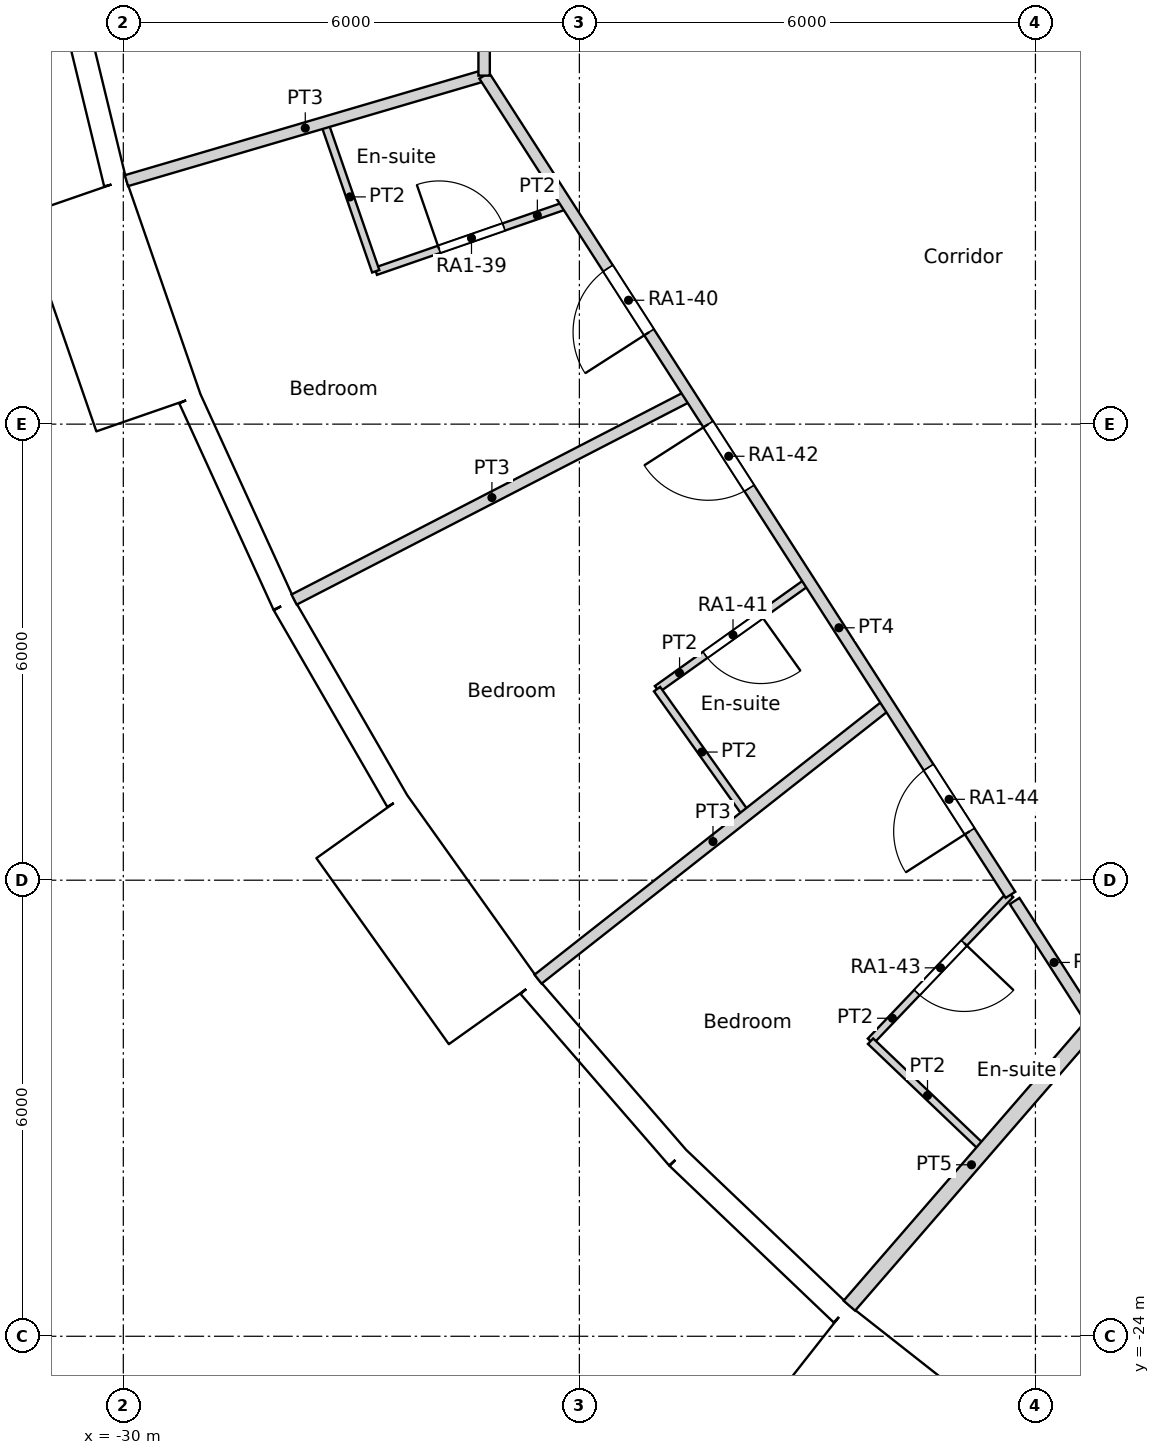
"""IFC4 building model, lengths in metres.
Left out: names, types, materials, properties, quantities, classifications, styles, units other than length and angle.
Written with IfcOpenShell. Run it as: python <this file> out.ifc"""

import sys

from ifc_helpers import new_model, si_unit, direction, frame, frame_2d, origin, origin_2d, place, context, subcontext, project, spatial, rectangle, circle, extrude, element, fill, save


model = new_model("IFC4")
c1 = context("Model", 3, precision=1e-05, world=origin(), true_north=direction((0.0, 1.0)))
c2 = subcontext(c1, "Body", "Model", "MODEL_VIEW")
j1 = project(units=[si_unit("LENGTHUNIT", "METRE"), si_unit("PLANEANGLEUNIT", "RADIAN")], contexts=[c1])
p1 = place(None, origin())
s1 = spatial("IfcSite", under=j1, at=p1, CompositionType="ELEMENT")
p2 = place(p1, origin())
s2 = spatial("IfcBuilding", under=s1, at=p2, CompositionType="ELEMENT")
p3 = place(p2, frame((0.0, 0.0, 28.2)))
s3 = spatial("IfcBuildingStorey", under=s2, at=p3, CompositionType="ELEMENT", Elevation=28.2)
for number, where, z_axis, x_axis in (
    (1, (-29.048, -8.529, 0.0), (0.0, 0.0, 1.0), (1.0, 0.0, 0.0)),
    (2, (-26.909, -13.873, 0.0), (0.0, 0.0, 1.0), (1.0, 0.0, 0.0)),
    (3, (-23.797, -18.715, 0.0), (0.0, 0.0, 1.0), (1.0, 0.0, 0.0)),
    (4, (-19.826, -22.88, 0.0), (0.0, 0.0, 1.0), (1.0, 0.0, 0.0)),
):
    element("IfcColumn", number, at=place(p3, frame(where, z_axis=z_axis, x_axis=x_axis)), inside=s3, PredefinedType="COLUMN", context=c2, shape_type="SweptSolid", body=[
        extrude(circle(Radius=0.7, at=origin_2d()), origin(), (0.0, 0.0, 1.0), 3.6),
    ])
for number, where, z_axis, x_axis in (
    (5, (-23.067, -8.396, 0.0), (0.0, 0.0, 1.0), (1.0, 0.0, 0.0)),
    (6, (-20.509, -13.489, 0.0), (0.0, 0.0, 1.0), (1.0, 0.0, 0.0)),
    (7, (-16.846, -17.855, 0.0), (0.0, 0.0, 1.0), (1.0, 0.0, 0.0)),
):
    element("IfcColumn", number, at=place(p3, frame(where, z_axis=z_axis, x_axis=x_axis)), inside=s3, PredefinedType="COLUMN", context=c2, shape_type="SweptSolid", body=[
        extrude(circle(Radius=0.75, at=origin_2d()), origin(), (0.0, 0.0, 1.0), 3.6),
    ])
p4 = place(p3, frame((-16.958, -8.167, 0.0), z_axis=(0.0, 0.0, 1.0), x_axis=(1.0, 0.0, 0.0)))
e8 = element("IfcColumn", 8, at=p4, inside=s3, PredefinedType="COLUMN", context=c2, shape_type="SweptSolid", body=[
    extrude(circle(Radius=0.8, at=origin_2d()), origin(), (0.0, 0.0, 1.0), 3.6),
])
p5 = place(p3, frame((-30.807, -5.938, 0.0), z_axis=(0.0, 0.0, 1.0), x_axis=(0.235743081534, -0.971815414319, 0.0)))
e9 = element("IfcWall", 9, at=p5, inside=s3, PredefinedType="SOLIDWALL", context=c2, shape_type="SweptSolid", body=[
    extrude(rectangle(XDim=2.979, YDim=0.3, at=frame_2d((1.49, 0.0))), origin(), (0.0, 0.0, 1.0), 3.15),
])
p6 = place(p5, frame((1.49, 0.0, 1.55)))
e10 = element("IfcOpeningElement", 10, at=p6, cuts=e9, PredefinedType="OPENING", context=c2, shape_type="SweptSolid", body=[
    extrude(circle(Radius=0.9, at=origin_2d()), frame((0.0, 0.16, 0.0), z_axis=(0.0, -1.0, 0.0), x_axis=(1.0, 0.0, 0.0)), (0.0, 0.0, 1.0), 0.32),
])
p7 = place(p3, frame((-30.649, -9.021, -0.45), z_axis=(0.0, 0.0, 1.0), x_axis=(0.327071431777, -0.944999618262, 0.0)))
e11 = element("IfcWall", 11, at=p7, inside=s3, PredefinedType="ELEMENTEDWALL", context=c2, shape_type="SweptSolid", body=[
    extrude(rectangle(XDim=3.0, YDim=1.45, at=frame_2d((1.5, 0.0))), origin(), (0.0, 0.0, 1.0), 3.6),
])
p8 = place(p7, frame((1.5, 0.0, 2.0)))
e12 = element("IfcOpeningElement", 12, at=p8, cuts=e11, PredefinedType="OPENING", context=c2, shape_type="SweptSolid", body=[
    extrude(circle(Radius=0.9, at=origin_2d()), frame((0.0, 0.735, 0.0), z_axis=(0.0, -1.0, 0.0), x_axis=(1.0, 0.0, 0.0)), (0.0, 0.0, 1.0), 1.47),
])
p9 = place(p3, frame((-29.125, -11.666, 0.0), z_axis=(0.0, 0.0, 1.0), x_axis=(0.415407317162, -0.909635509888, 0.0)))
e13 = element("IfcWall", 13, at=p9, inside=s3, PredefinedType="SOLIDWALL", context=c2, shape_type="SweptSolid", body=[
    extrude(rectangle(XDim=2.98, YDim=0.3, at=frame_2d((1.49, 0.0))), origin(), (0.0, 0.0, 1.0), 3.15),
])
p10 = place(p9, frame((1.49, 0.0, 1.55)))
e14 = element("IfcOpeningElement", 14, at=p10, cuts=e13, PredefinedType="OPENING", context=c2, shape_type="SweptSolid", body=[
    extrude(circle(Radius=0.9, at=origin_2d()), frame((0.0, 0.16, 0.0), z_axis=(0.0, -1.0, 0.0), x_axis=(1.0, 0.0, 0.0)), (0.0, 0.0, 1.0), 0.32),
])
p11 = place(p3, frame((-27.887, -14.377, 0.0), z_axis=(0.0, 0.0, 1.0), x_axis=(0.499999078476, -0.866025935826, 0.0)))
e15 = element("IfcWall", 15, at=p11, inside=s3, PredefinedType="SOLIDWALL", context=c2, shape_type="SweptSolid", body=[
    extrude(rectangle(XDim=2.979, YDim=0.3, at=frame_2d((1.49, 0.0))), origin(), (0.0, 0.0, 1.0), 3.15),
])
p12 = place(p11, frame((1.49, 0.0, 1.55)))
e16 = element("IfcOpeningElement", 16, at=p12, cuts=e15, PredefinedType="OPENING", context=c2, shape_type="SweptSolid", body=[
    extrude(circle(Radius=0.9, at=origin_2d()), frame((0.0, 0.16, 0.0), z_axis=(0.0, -1.0, 0.0), x_axis=(1.0, 0.0, 0.0)), (0.0, 0.0, 1.0), 0.32),
])
p13 = place(p3, frame((-26.866, -17.29, -0.45), z_axis=(0.0, 0.0, 1.0), x_axis=(0.580090570606, -0.814551981088, 0.0)))
e17 = element("IfcWall", 17, at=p13, inside=s3, PredefinedType="ELEMENTEDWALL", context=c2, shape_type="SweptSolid", body=[
    extrude(rectangle(XDim=3.0, YDim=1.45, at=frame_2d((1.5, 0.0))), origin(), (0.0, 0.0, 1.0), 3.6),
])
p14 = place(p13, frame((1.5, 0.0, 2.0)))
e18 = element("IfcOpeningElement", 18, at=p14, cuts=e17, PredefinedType="OPENING", context=c2, shape_type="SweptSolid", body=[
    extrude(circle(Radius=0.9, at=origin_2d()), frame((0.0, 0.735, 0.0), z_axis=(0.0, -1.0, 0.0), x_axis=(1.0, 0.0, 0.0)), (0.0, 0.0, 1.0), 1.47),
])
p15 = place(p3, frame((-24.658, -19.399, 0.0), z_axis=(0.0, 0.0, 1.0), x_axis=(0.654830712471, -0.755775587066, 0.0)))
e19 = element("IfcWall", 19, at=p15, inside=s3, PredefinedType="SOLIDWALL", context=c2, shape_type="SweptSolid", body=[
    extrude(rectangle(XDim=2.98, YDim=0.3, at=frame_2d((1.49, 0.0))), origin(), (0.0, 0.0, 1.0), 3.15),
])
p16 = place(p15, frame((1.49, 0.0, 1.55)))
e20 = element("IfcOpeningElement", 20, at=p16, cuts=e19, PredefinedType="OPENING", context=c2, shape_type="SweptSolid", body=[
    extrude(circle(Radius=0.9, at=origin_2d()), frame((0.0, 0.16, 0.0), z_axis=(0.0, -1.0, 0.0), x_axis=(1.0, 0.0, 0.0)), (0.0, 0.0, 1.0), 0.32),
])
p17 = place(p3, frame((-22.707, -21.651, 0.0), z_axis=(0.0, 0.0, 1.0), x_axis=(0.723744206617, -0.690068346896, 0.0)))
e21 = element("IfcWall", 21, at=p17, inside=s3, PredefinedType="SOLIDWALL", context=c2, shape_type="SweptSolid", body=[
    extrude(rectangle(XDim=2.98, YDim=0.3, at=frame_2d((1.49, 0.0))), origin(), (0.0, 0.0, 1.0), 3.15),
])
p18 = place(p17, frame((1.49, 0.0, 1.55)))
e22 = element("IfcOpeningElement", 22, at=p18, cuts=e21, PredefinedType="OPENING", context=c2, shape_type="SweptSolid", body=[
    extrude(circle(Radius=0.9, at=origin_2d()), frame((0.0, 0.16, 0.0), z_axis=(0.0, -1.0, 0.0), x_axis=(1.0, 0.0, 0.0)), (0.0, 0.0, 1.0), 0.32),
])
p19 = place(p3, frame((-20.907, -24.159, -0.45), z_axis=(0.0, 0.0, 1.0), x_axis=(0.786049992888, -0.618162930529, 0.0)))
e23 = element("IfcWall", 23, at=p19, inside=s3, PredefinedType="ELEMENTEDWALL", context=c2, shape_type="SweptSolid", body=[
    extrude(rectangle(XDim=3.0, YDim=1.45, at=frame_2d((1.5, 0.0))), origin(), (0.0, 0.0, 1.0), 3.6),
])
p20 = place(p19, frame((1.5, 0.0, 2.0)))
e24 = element("IfcOpeningElement", 24, at=p20, cuts=e23, PredefinedType="OPENING", context=c2, shape_type="SweptSolid", body=[
    extrude(circle(Radius=0.9, at=origin_2d()), frame((0.0, 0.735, 0.0), z_axis=(0.0, -1.0, 0.0), x_axis=(1.0, 0.0, 0.0)), (0.0, 0.0, 1.0), 1.47),
])
p21 = place(p3, frame((-25.253, -7.415, 0.0), z_axis=(0.0, 0.0, 1.0), x_axis=(0.0, 1.0, 0.0)))
e25 = element("IfcWall", 25, at=p21, inside=s3, PredefinedType="PARTITIONING", context=c2, shape_type="SweptSolid", body=[
    extrude(rectangle(XDim=14.83, YDim=0.15, at=frame_2d((7.415, 0.0))), origin(), (0.0, 0.0, 1.0), 3.15),
])
p22 = place(p21, frame((12.797, 0.0, 0.0)))
e26 = element("IfcOpeningElement", 26, at=p22, cuts=e25, PredefinedType="OPENING", context=c2, shape_type="SweptSolid", body=[
    extrude(rectangle(XDim=1.0, YDim=2.1, at=frame_2d((0.5, 1.05))), frame((0.0, 0.075, 0.0), z_axis=(0.0, -1.0, 0.0), x_axis=(1.0, 0.0, 0.0)), (0.0, 0.0, 1.0), 0.15),
])
p23 = place(p21, frame((5.954, 0.0, 0.0)))
e27 = element("IfcOpeningElement", 27, at=p23, cuts=e25, PredefinedType="OPENING", context=c2, shape_type="SweptSolid", body=[
    extrude(rectangle(XDim=1.0, YDim=2.1, at=frame_2d((0.5, 1.05))), frame((0.0, 0.075, 0.0), z_axis=(0.0, -1.0, 0.0), x_axis=(1.0, 0.0, 0.0)), (0.0, 0.0, 1.0), 0.15),
])
p24 = place(p21, frame((1.034, 0.0, 0.0)))
e28 = element("IfcOpeningElement", 28, at=p24, cuts=e25, PredefinedType="OPENING", context=c2, shape_type="SweptSolid", body=[
    extrude(rectangle(XDim=1.0, YDim=2.1, at=frame_2d((0.5, 1.05))), frame((0.0, 0.075, 0.0), z_axis=(0.0, -1.0, 0.0), x_axis=(1.0, 0.0, 0.0)), (0.0, 0.0, 1.0), 0.15),
])
p25 = place(p3, frame((-25.252, -7.415, 0.0), z_axis=(0.0, 0.0, 1.0), x_axis=(0.540498462047, -0.84134500208, 0.0)))
e29 = element("IfcWall", 29, at=p25, inside=s3, PredefinedType="PARTITIONING", context=c2, shape_type="SweptSolid", body=[
    extrude(rectangle(XDim=12.811, YDim=0.15, at=frame_2d((6.405, 0.0))), origin(), (0.0, 0.0, 1.0), 3.15),
])
p26 = place(p25, frame((3.013, 0.0, 0.0)))
e30 = element("IfcOpeningElement", 30, at=p26, cuts=e29, PredefinedType="OPENING", context=c2, shape_type="SweptSolid", body=[
    extrude(rectangle(XDim=1.0, YDim=2.1, at=frame_2d((0.5, 1.05))), frame((0.0, 0.075, 0.0), z_axis=(0.0, -1.0, 0.0), x_axis=(1.0, 0.0, 0.0)), (0.0, 0.0, 1.0), 0.15),
])
p27 = place(p25, frame((5.452, 0.0, 0.0)))
e31 = element("IfcOpeningElement", 31, at=p27, cuts=e29, PredefinedType="OPENING", context=c2, shape_type="SweptSolid", body=[
    extrude(rectangle(XDim=1.0, YDim=2.1, at=frame_2d((0.5, 1.05))), frame((0.0, 0.075, 0.0), z_axis=(0.0, -1.0, 0.0), x_axis=(1.0, 0.0, 0.0)), (0.0, 0.0, 1.0), 0.15),
])
p28 = place(p25, frame((10.817, 0.0, 0.0)))
e32 = element("IfcOpeningElement", 32, at=p28, cuts=e29, PredefinedType="OPENING", context=c2, shape_type="SweptSolid", body=[
    extrude(rectangle(XDim=1.0, YDim=2.1, at=frame_2d((0.5, 1.05))), frame((0.0, 0.075, 0.0), z_axis=(0.0, -1.0, 0.0), x_axis=(1.0, 0.0, 0.0)), (0.0, 0.0, 1.0), 0.15),
])
p29 = place(p3, frame((-18.274, -18.274, 0.0), z_axis=(0.0, 0.0, 1.0), x_axis=(0.540751168176, -0.841182604502, 0.0)))
e33 = element("IfcWall", 33, at=p29, inside=s3, PredefinedType="PARTITIONING", context=c2, shape_type="SweptSolid", body=[
    extrude(rectangle(XDim=1.921, YDim=0.15, at=frame_2d((0.96, 0.0))), origin(), (0.0, 0.0, 1.0), 3.15),
])
p30 = place(p3, frame((-29.959, -8.797, 0.0), z_axis=(0.0, 0.0, 1.0), x_axis=(0.959434430266, 0.281931860598, 0.0)))
e34 = element("IfcWall", 34, at=p30, inside=s3, PredefinedType="PARTITIONING", context=c2, shape_type="SweptSolid", body=[
    extrude(rectangle(XDim=4.905, YDim=0.15, at=frame_2d((2.452, 0.0))), origin(), (0.0, 0.0, 1.0), 3.15),
])
p31 = place(p3, frame((-27.356, -8.032, 0.0), z_axis=(0.0, 0.0, 1.0), x_axis=(0.326924291943, -0.945050531632, 0.0)))
e35 = element("IfcWall", 35, at=p31, inside=s3, PredefinedType="PARTITIONING", context=c2, shape_type="SweptSolid", body=[
    extrude(rectangle(XDim=2.071, YDim=0.1, at=frame_2d((1.035, 0.0))), origin(), (0.0, 0.0, 1.0), 3.15),
])
p32 = place(p3, frame((-26.679, -9.989, 0.0), z_axis=(0.0, 0.0, 1.0), x_axis=(0.945014370431, 0.327028805578, 0.0)))
e36 = element("IfcWall", 36, at=p32, inside=s3, PredefinedType="PARTITIONING", context=c2, shape_type="SweptSolid", body=[
    extrude(rectangle(XDim=2.667, YDim=0.1, at=frame_2d((1.333, 0.0))), origin(), (0.0, 0.0, 1.0), 3.15),
])
p33 = place(p32, frame((0.883, 0.0, 0.0)))
e37 = element("IfcOpeningElement", 37, at=p33, cuts=e36, PredefinedType="OPENING", context=c2, shape_type="SweptSolid", body=[
    extrude(rectangle(XDim=0.9, YDim=2.04, at=frame_2d((0.45, 1.02))), frame((0.0, 0.05, 0.0), z_axis=(0.0, -1.0, 0.0), x_axis=(1.0, 0.0, 0.0)), (0.0, 0.0, 1.0), 0.1),
])
p34 = place(p3, frame((-27.753, -14.308, 0.0), z_axis=(0.0, 0.0, 1.0), x_axis=(0.88877955153, 0.45833493079, 0.0)))
e38 = element("IfcWall", 38, at=p34, inside=s3, PredefinedType="PARTITIONING", context=c2, shape_type="SweptSolid", body=[
    extrude(rectangle(XDim=5.856, YDim=0.15, at=frame_2d((2.928, 0.0))), origin(), (0.0, 0.0, 1.0), 3.15),
])
p35 = place(p3, frame((-22.978, -15.486, 0.0), z_axis=(0.0, 0.0, 1.0), x_axis=(0.814519517834, 0.580136152181, 0.0)))
e39 = element("IfcWall", 39, at=p35, inside=s3, PredefinedType="PARTITIONING", context=c2, shape_type="SweptSolid", body=[
    extrude(rectangle(XDim=2.453, YDim=0.1, at=frame_2d((1.227, 0.0))), origin(), (0.0, 0.0, 1.0), 3.15),
])
p36 = place(p35, frame((0.777, 0.0, 0.0)))
e40 = element("IfcOpeningElement", 40, at=p36, cuts=e39, PredefinedType="OPENING", context=c2, shape_type="SweptSolid", body=[
    extrude(rectangle(XDim=0.9, YDim=2.04, at=frame_2d((0.45, 1.02))), frame((0.0, 0.05, 0.0), z_axis=(0.0, -1.0, 0.0), x_axis=(1.0, 0.0, 0.0)), (0.0, 0.0, 1.0), 0.1),
])
p37 = place(p3, frame((-22.978, -15.486, 0.0), z_axis=(0.0, 0.0, 1.0), x_axis=(0.580283748447, -0.814414373208, 0.0)))
e41 = element("IfcWall", 41, at=p37, inside=s3, PredefinedType="PARTITIONING", context=c2, shape_type="SweptSolid", body=[
    extrude(rectangle(XDim=2.033, YDim=0.1, at=frame_2d((1.017, 0.0))), origin(), (0.0, 0.0, 1.0), 3.15),
])
p38 = place(p3, frame((-24.544, -19.302, 0.0), z_axis=(0.0, 0.0, 1.0), x_axis=(0.78597832915, 0.618254046576, 0.0)))
e42 = element("IfcWall", 42, at=p38, inside=s3, PredefinedType="PARTITIONING", context=c2, shape_type="SweptSolid", body=[
    extrude(rectangle(XDim=5.857, YDim=0.15, at=frame_2d((2.929, 0.0))), origin(), (0.0, 0.0, 1.0), 3.15),
])
p39 = place(p3, frame((-20.169, -20.118, 0.0), z_axis=(0.0, 0.0, 1.0), x_axis=(0.690011756227, 0.723798159896, 0.0)))
e43 = element("IfcWall", 43, at=p39, inside=s3, PredefinedType="PARTITIONING", context=c2, shape_type="SweptSolid", body=[
    extrude(rectangle(XDim=2.667, YDim=0.1, at=frame_2d((1.333, 0.0))), origin(), (0.0, 0.0, 1.0), 3.15),
])
p40 = place(p39, frame((0.884, 0.0, 0.0)))
e44 = element("IfcOpeningElement", 44, at=p40, cuts=e43, PredefinedType="OPENING", context=c2, shape_type="SweptSolid", body=[
    extrude(rectangle(XDim=0.9, YDim=2.04, at=frame_2d((0.45, 1.02))), frame((0.0, 0.05, 0.0), z_axis=(0.0, -1.0, 0.0), x_axis=(1.0, 0.0, 0.0)), (0.0, 0.0, 1.0), 0.1),
])
p41 = place(p3, frame((-20.169, -20.118, 0.0), z_axis=(0.0, 0.0, 1.0), x_axis=(0.723537557066, -0.690285016145, 0.0)))
e45 = element("IfcWall", 45, at=p41, inside=s3, PredefinedType="PARTITIONING", context=c2, shape_type="SweptSolid", body=[
    extrude(rectangle(XDim=2.071, YDim=0.1, at=frame_2d((1.035, 0.0))), origin(), (0.0, 0.0, 1.0), 3.15),
])
p42 = place(p3, frame((-20.448, -23.598, 0.0), z_axis=(0.0, 0.0, 1.0), x_axis=(0.654847179409, 0.755761319214, 0.0)))
e46 = element("IfcWall", 46, at=p42, inside=s3, PredefinedType="PARTITIONING", context=c2, shape_type="SweptSolid", body=[
    extrude(rectangle(XDim=4.906, YDim=0.2, at=frame_2d((2.453, 0.0))), origin(), (0.0, 0.0, 1.0), 3.15),
])
p43 = place(p6, origin())
e47 = element("IfcWindow", 47, at=p43, inside=s3, PartitioningType="SINGLE_PANEL", PredefinedType="WINDOW", context=c2, shape_type="SweptSolid", body=[
    extrude(circle(Radius=0.9, at=origin_2d()), frame((0.0, 0.12, 0.0), z_axis=(0.0, -1.0, 0.0), x_axis=(1.0, 0.0, 0.0)), (0.0, 0.0, 1.0), 0.1),
])
fill(e10, e47)
p44 = place(p8, origin())
e48 = element("IfcWindow", 48, at=p44, inside=s3, PartitioningType="SINGLE_PANEL", PredefinedType="WINDOW", context=c2, shape_type="SweptSolid", body=[
    extrude(circle(Radius=0.9, at=origin_2d()), frame((0.0, 0.695, 0.0), z_axis=(0.0, -1.0, 0.0), x_axis=(1.0, 0.0, 0.0)), (0.0, 0.0, 1.0), 0.1),
])
fill(e12, e48)
p45 = place(p10, origin())
e49 = element("IfcWindow", 49, at=p45, inside=s3, PartitioningType="SINGLE_PANEL", PredefinedType="WINDOW", context=c2, shape_type="SweptSolid", body=[
    extrude(circle(Radius=0.9, at=origin_2d()), frame((0.0, 0.12, 0.0), z_axis=(0.0, -1.0, 0.0), x_axis=(1.0, 0.0, 0.0)), (0.0, 0.0, 1.0), 0.1),
])
fill(e14, e49)
p46 = place(p12, origin())
e50 = element("IfcWindow", 50, at=p46, inside=s3, PartitioningType="SINGLE_PANEL", PredefinedType="WINDOW", context=c2, shape_type="SweptSolid", body=[
    extrude(circle(Radius=0.9, at=origin_2d()), frame((0.0, 0.12, 0.0), z_axis=(0.0, -1.0, 0.0), x_axis=(1.0, 0.0, 0.0)), (0.0, 0.0, 1.0), 0.1),
])
fill(e16, e50)
p47 = place(p14, origin())
e51 = element("IfcWindow", 51, at=p47, inside=s3, PartitioningType="SINGLE_PANEL", PredefinedType="WINDOW", context=c2, shape_type="SweptSolid", body=[
    extrude(circle(Radius=0.9, at=origin_2d()), frame((0.0, 0.695, 0.0), z_axis=(0.0, -1.0, 0.0), x_axis=(1.0, 0.0, 0.0)), (0.0, 0.0, 1.0), 0.1),
])
fill(e18, e51)
p48 = place(p16, origin())
e52 = element("IfcWindow", 52, at=p48, inside=s3, PartitioningType="SINGLE_PANEL", PredefinedType="WINDOW", context=c2, shape_type="SweptSolid", body=[
    extrude(circle(Radius=0.9, at=origin_2d()), frame((0.0, 0.12, 0.0), z_axis=(0.0, -1.0, 0.0), x_axis=(1.0, 0.0, 0.0)), (0.0, 0.0, 1.0), 0.1),
])
fill(e20, e52)
p49 = place(p18, origin())
e53 = element("IfcWindow", 53, at=p49, inside=s3, PartitioningType="SINGLE_PANEL", PredefinedType="WINDOW", context=c2, shape_type="SweptSolid", body=[
    extrude(circle(Radius=0.9, at=origin_2d()), frame((0.0, 0.12, 0.0), z_axis=(0.0, -1.0, 0.0), x_axis=(1.0, 0.0, 0.0)), (0.0, 0.0, 1.0), 0.1),
])
fill(e22, e53)
p50 = place(p20, origin())
e54 = element("IfcWindow", 54, at=p50, inside=s3, PartitioningType="SINGLE_PANEL", PredefinedType="WINDOW", context=c2, shape_type="SweptSolid", body=[
    extrude(circle(Radius=0.9, at=origin_2d()), frame((0.0, 0.695, 0.0), z_axis=(0.0, -1.0, 0.0), x_axis=(1.0, 0.0, 0.0)), (0.0, 0.0, 1.0), 0.1),
])
fill(e24, e54)
p51 = place(p33, origin())
e55 = element("IfcDoor", 55, at=p51, inside=s3, OperationType="SINGLE_SWING_LEFT", PredefinedType="DOOR", context=c2, shape_type="SweptSolid", body=[
    extrude(rectangle(XDim=0.9, YDim=2.04, at=frame_2d((0.45, 1.02))), frame((0.0, 0.025, 0.0), z_axis=(0.0, -1.0, 0.0), x_axis=(1.0, 0.0, 0.0)), (0.0, 0.0, 1.0), 0.05),
])
fill(e37, e55)
p52 = place(p26, origin())
e56 = element("IfcDoor", 56, at=p52, inside=s3, OperationType="SINGLE_SWING_LEFT", PredefinedType="DOOR", context=c2, shape_type="SweptSolid", body=[
    extrude(rectangle(XDim=1.0, YDim=2.1, at=frame_2d((0.5, 1.05))), frame((0.0, 0.025, 0.0), z_axis=(0.0, -1.0, 0.0), x_axis=(1.0, 0.0, 0.0)), (0.0, 0.0, 1.0), 0.05),
])
fill(e30, e56)
p53 = place(p36, origin())
e57 = element("IfcDoor", 57, at=p53, inside=s3, OperationType="SINGLE_SWING_LEFT", PredefinedType="DOOR", context=c2, shape_type="SweptSolid", body=[
    extrude(rectangle(XDim=0.9, YDim=2.04, at=frame_2d((0.45, 1.02))), frame((0.0, 0.025, 0.0), z_axis=(0.0, -1.0, 0.0), x_axis=(1.0, 0.0, 0.0)), (0.0, 0.0, 1.0), 0.05),
])
fill(e40, e57)
p54 = place(p27, origin())
e58 = element("IfcDoor", 58, at=p54, inside=s3, OperationType="SINGLE_SWING_RIGHT", PredefinedType="DOOR", context=c2, shape_type="SweptSolid", body=[
    extrude(rectangle(XDim=1.0, YDim=2.1, at=frame_2d((0.5, 1.05))), frame((0.0, 0.025, 0.0), z_axis=(0.0, -1.0, 0.0), x_axis=(1.0, 0.0, 0.0)), (0.0, 0.0, 1.0), 0.05),
])
fill(e31, e58)
p55 = place(p40, origin())
e59 = element("IfcDoor", 59, at=p55, inside=s3, OperationType="SINGLE_SWING_LEFT", PredefinedType="DOOR", context=c2, shape_type="SweptSolid", body=[
    extrude(rectangle(XDim=0.9, YDim=2.04, at=frame_2d((0.45, 1.02))), frame((0.0, 0.025, 0.0), z_axis=(0.0, -1.0, 0.0), x_axis=(1.0, 0.0, 0.0)), (0.0, 0.0, 1.0), 0.05),
])
fill(e44, e59)
p56 = place(p28, origin())
e60 = element("IfcDoor", 60, at=p56, inside=s3, OperationType="SINGLE_SWING_LEFT", PredefinedType="DOOR", context=c2, shape_type="SweptSolid", body=[
    extrude(rectangle(XDim=1.0, YDim=2.1, at=frame_2d((0.5, 1.05))), frame((0.0, 0.025, 0.0), z_axis=(0.0, -1.0, 0.0), x_axis=(1.0, 0.0, 0.0)), (0.0, 0.0, 1.0), 0.05),
])
fill(e32, e60)
save(model, sys.argv[1])
